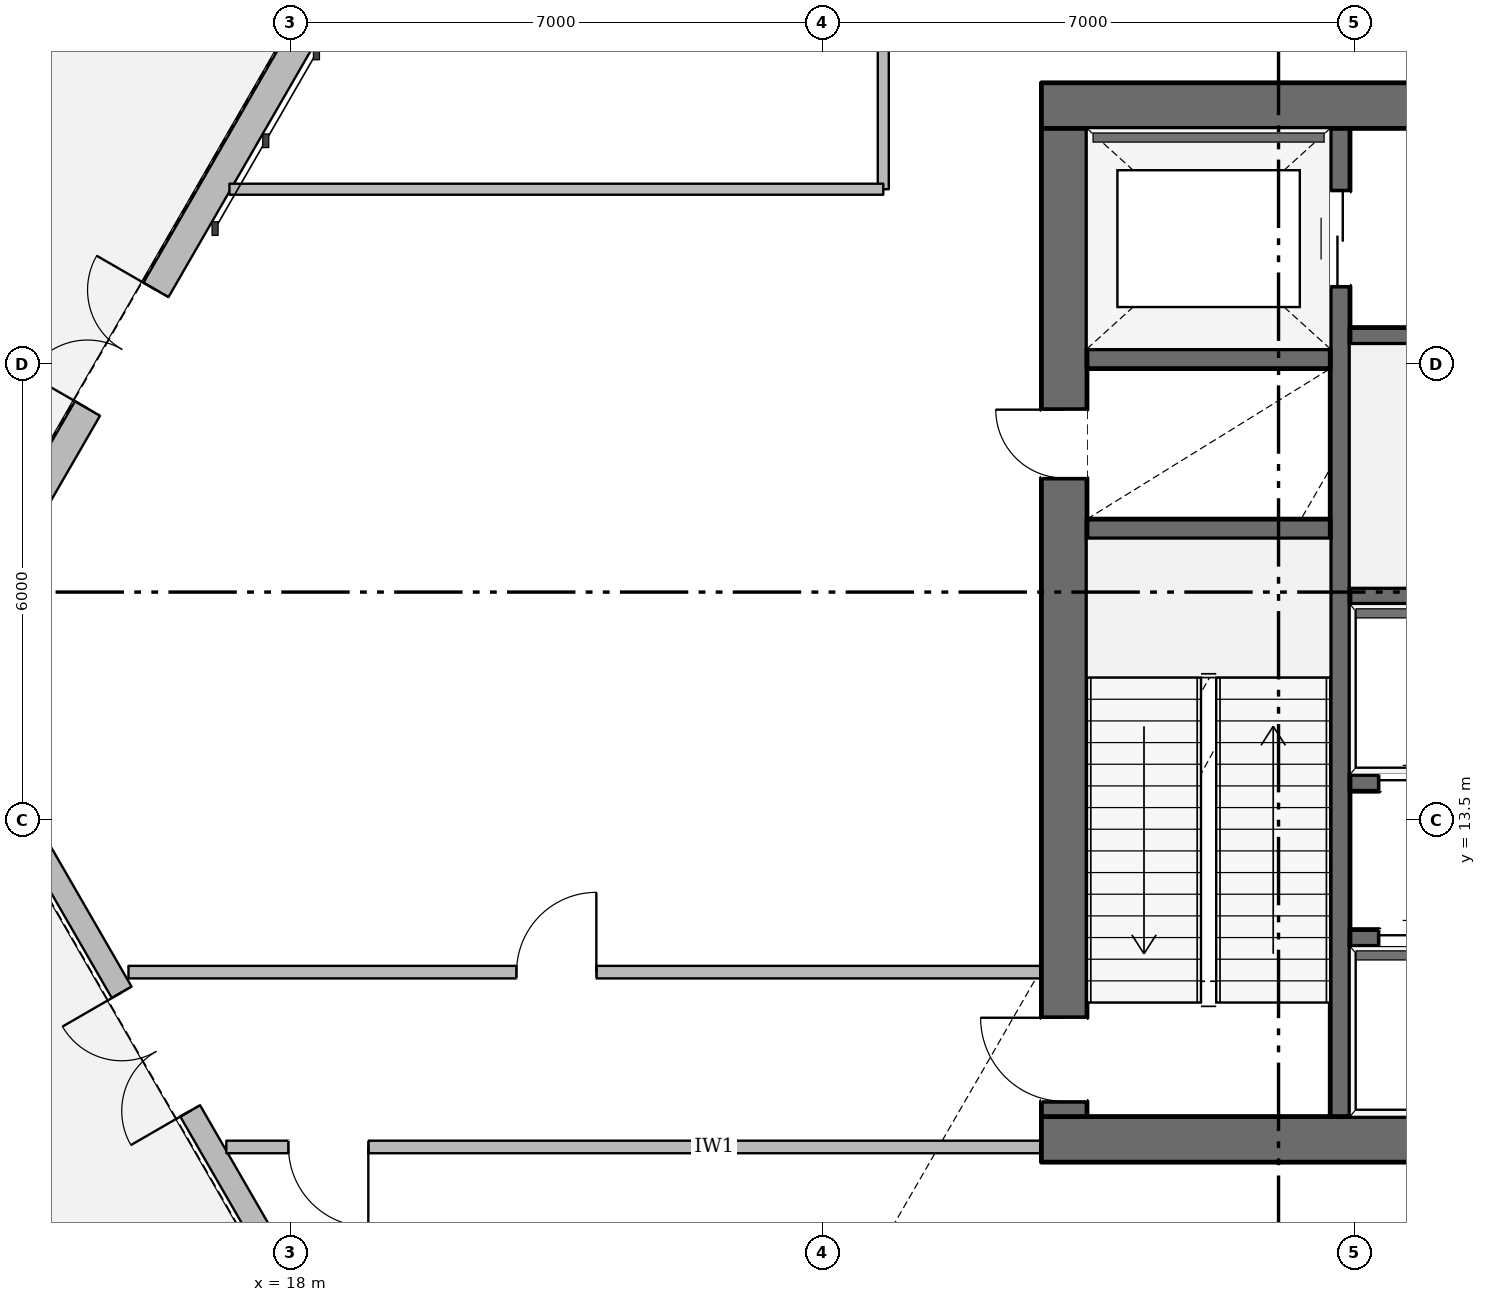
"""IFC4 building model, lengths in metres.
Left out: names, types, materials, properties, quantities, classifications, styles, units other than length and angle.
Written with IfcOpenShell. Run it as: python <this file> out.ifc"""

import sys

from ifc_helpers import new_model, si_unit, direction, frame, frame_2d, origin, place, context, subcontext, project, spatial, rectangle, extrude, element, fill, save


model = new_model("IFC4")
c1 = context("Model", 3, precision=1e-05, world=origin(), true_north=direction((0.0, 1.0)))
c2 = subcontext(c1, "Body", "Model", "MODEL_VIEW")
j1 = project(units=[si_unit("LENGTHUNIT", "METRE"), si_unit("PLANEANGLEUNIT", "RADIAN")], contexts=[c1])
p1 = place(None, origin())
s1 = spatial("IfcSite", under=j1, at=p1, CompositionType="ELEMENT")
p2 = place(p1, origin())
s2 = spatial("IfcBuilding", under=s1, at=p2, CompositionType="ELEMENT")
p3 = place(p2, origin())
s3 = spatial("IfcBuildingStorey", under=s2, at=p3, CompositionType="ELEMENT", Elevation=0.0)
p4 = place(p3, frame((27.88, 9.3, 0.0), z_axis=(0.0, 0.0, 1.0), x_axis=(1.0, 0.0, 0.0)))
e1 = element("IfcWall", 1, at=p4, inside=s3, PredefinedType="SOLIDWALL", context=c2, shape_type="SweptSolid", body=[
    extrude(rectangle(XDim=20.24, YDim=0.6, at=frame_2d((10.12, 0.0))), origin(), (0.0, 0.0, 1.0), 5.74),
])
p5 = place(p4, frame((10.62, 0.0, 0.0)))
e2 = element("IfcOpeningElement", 2, at=p5, cuts=e1, PredefinedType="OPENING", context=c2, shape_type="SweptSolid", body=[
    extrude(rectangle(XDim=1.4, YDim=2.2, at=frame_2d((0.7, 1.1))), frame((0.0, 0.31, 0.0), z_axis=(0.0, -1.0, 0.0), x_axis=(1.0, 0.0, 0.0)), (0.0, 0.0, 1.0), 0.62),
])
p6 = place(p3, frame((27.88, 22.9, 0.0), z_axis=(0.0, 0.0, 1.0), x_axis=(1.0, 0.0, 0.0)))
e3 = element("IfcWall", 3, at=p6, inside=s3, PredefinedType="SOLIDWALL", context=c2, shape_type="SweptSolid", body=[
    extrude(rectangle(XDim=20.24, YDim=0.6, at=frame_2d((10.12, 0.0))), origin(), (0.0, 0.0, 1.0), 5.74),
])
p7 = place(p6, frame((9.595, 0.0, 0.0)))
e4 = element("IfcOpeningElement", 4, at=p7, cuts=e3, PredefinedType="OPENING", context=c2, shape_type="SweptSolid", body=[
    extrude(rectangle(XDim=1.05, YDim=2.15, at=frame_2d((0.525, 1.075))), frame((0.0, 0.31, 0.0), z_axis=(0.0, -1.0, 0.0), x_axis=(1.0, 0.0, 0.0)), (0.0, 0.0, 1.0), 0.62),
])
p8 = place(p6, frame((5.995, 0.0, 0.0)))
e5 = element("IfcOpeningElement", 5, at=p8, cuts=e3, PredefinedType="OPENING", context=c2, shape_type="SweptSolid", body=[
    extrude(rectangle(XDim=1.05, YDim=2.15, at=frame_2d((0.525, 1.075))), frame((0.0, 0.31, 0.0), z_axis=(0.0, -1.0, 0.0), x_axis=(1.0, 0.0, 0.0)), (0.0, 0.0, 1.0), 0.62),
])
p9 = place(p3, frame((28.18, 9.6, 0.0), z_axis=(0.0, 0.0, 1.0), x_axis=(0.0, 1.0, 0.0)))
e6 = element("IfcWall", 6, at=p9, inside=s3, PredefinedType="SOLIDWALL", context=c2, shape_type="SweptSolid", body=[
    extrude(rectangle(XDim=13.0, YDim=0.6, at=frame_2d((6.5, 0.0))), origin(), (0.0, 0.0, 1.0), 5.74),
])
p10 = place(p9, frame((8.4, 0.0, 0.0)))
e7 = element("IfcOpeningElement", 7, at=p10, cuts=e6, PredefinedType="OPENING", context=c2, shape_type="SweptSolid", body=[
    extrude(rectangle(XDim=0.9, YDim=2.1, at=frame_2d((0.45, 1.05))), frame((0.0, 0.31, 0.0), z_axis=(0.0, -1.0, 0.0), x_axis=(1.0, 0.0, 0.0)), (0.0, 0.0, 1.0), 0.62),
])
p11 = place(p9, frame((0.2, 0.0, 0.0)))
e8 = element("IfcOpeningElement", 8, at=p11, cuts=e6, PredefinedType="OPENING", context=c2, shape_type="SweptSolid", body=[
    extrude(rectangle(XDim=1.1, YDim=2.15, at=frame_2d((0.55, 1.075))), frame((0.0, 0.31, 0.0), z_axis=(0.0, -1.0, 0.0), x_axis=(1.0, 0.0, 0.0)), (0.0, 0.0, 1.0), 0.62),
])
p12 = place(p3, frame((31.81, 9.6, 0.0), z_axis=(0.0, 0.0, 1.0), x_axis=(0.0, 1.0, 0.0)))
e9 = element("IfcWall", 9, at=p12, inside=s3, PredefinedType="SHEAR", context=c2, shape_type="SweptSolid", body=[
    extrude(rectangle(XDim=13.0, YDim=0.26, at=frame_2d((6.5, 0.0))), origin(), (0.0, 0.0, 1.0), 5.74),
])
p13 = place(p12, frame((10.925, 0.0, 0.0)))
e10 = element("IfcOpeningElement", 10, at=p13, cuts=e9, PredefinedType="OPENING", context=c2, shape_type="SweptSolid", body=[
    extrude(rectangle(XDim=1.25, YDim=2.25, at=frame_2d((0.625, 1.125))), frame((0.0, 0.14, 0.0), z_axis=(0.0, -1.0, 0.0), x_axis=(1.0, 0.0, 0.0)), (0.0, 0.0, 1.0), 0.28),
])
for number, where, z_axis, x_axis in (
    (11, (28.48, 17.33, 0.0), (0.0, 0.0, 1.0), (1.0, 0.0, 0.0)),
    (12, (28.48, 19.57, 0.0), (0.0, 0.0, 1.0), (1.0, 0.0, 0.0)),
):
    element("IfcWall", number, at=place(p3, frame(where, z_axis=z_axis, x_axis=x_axis)), inside=s3, PredefinedType="SHEAR", context=c2, shape_type="SweptSolid", body=[
        extrude(rectangle(XDim=3.2, YDim=0.26, at=frame_2d((1.6, 0.0))), origin(), (0.0, 0.0, 1.0), 5.74),
    ])
p14 = place(p3, frame((31.94, 19.87, 0.0), z_axis=(0.0, 0.0, 1.0), x_axis=(1.0, 0.0, 0.0)))
e13 = element("IfcWall", 13, at=p14, inside=s3, PredefinedType="SOLIDWALL", context=c2, shape_type="SweptSolid", body=[
    extrude(rectangle(XDim=12.12, YDim=0.22, at=frame_2d((6.06, 0.0))), origin(), (0.0, 0.0, 1.0), 5.74),
])
p15 = place(p14, frame((9.51, 0.0, 0.0)))
e14 = element("IfcOpeningElement", 14, at=p15, cuts=e13, PredefinedType="OPENING", context=c2, shape_type="SweptSolid", body=[
    extrude(rectangle(XDim=0.9, YDim=2.1, at=frame_2d((0.45, 1.05))), frame((0.0, 0.12, 0.0), z_axis=(0.0, -1.0, 0.0), x_axis=(1.0, 0.0, 0.0)), (0.0, 0.0, 1.0), 0.24),
])
p16 = place(p3, frame((31.94, 16.45, 0.0), z_axis=(0.0, 0.0, 1.0), x_axis=(1.0, 0.0, 0.0)))
e15 = element("IfcWall", 15, at=p16, inside=s3, PredefinedType="SOLIDWALL", context=c2, shape_type="SweptSolid", body=[
    extrude(rectangle(XDim=12.12, YDim=0.22, at=frame_2d((6.06, 0.0))), origin(), (0.0, 0.0, 1.0), 5.74),
])
p17 = place(p3, frame((31.94, 13.99, 0.0), z_axis=(0.0, 0.0, 1.0), x_axis=(1.0, 0.0, 0.0)))
e16 = element("IfcWall", 16, at=p17, inside=s3, PredefinedType="SOLIDWALL", context=c2, shape_type="SweptSolid", body=[
    extrude(rectangle(XDim=12.12, YDim=0.22, at=frame_2d((6.06, 0.0))), origin(), (0.0, 0.0, 1.0), 5.74),
])
p18 = place(p17, frame((0.385, 0.0, 0.0)))
e17 = element("IfcOpeningElement", 17, at=p18, cuts=e16, PredefinedType="OPENING", context=c2, shape_type="SweptSolid", body=[
    extrude(rectangle(XDim=1.1, YDim=2.2, at=frame_2d((0.55, 1.1))), frame((0.0, 0.12, 0.0), z_axis=(0.0, -1.0, 0.0), x_axis=(1.0, 0.0, 0.0)), (0.0, 0.0, 1.0), 0.24),
])
p19 = place(p17, frame((2.435, 0.0, 0.0)))
e18 = element("IfcOpeningElement", 18, at=p19, cuts=e16, PredefinedType="OPENING", context=c2, shape_type="SweptSolid", body=[
    extrude(rectangle(XDim=1.1, YDim=2.2, at=frame_2d((0.55, 1.1))), frame((0.0, 0.12, 0.0), z_axis=(0.0, -1.0, 0.0), x_axis=(1.0, 0.0, 0.0)), (0.0, 0.0, 1.0), 0.24),
])
p20 = place(p17, frame((4.485, 0.0, 0.0)))
e19 = element("IfcOpeningElement", 19, at=p20, cuts=e16, PredefinedType="OPENING", context=c2, shape_type="SweptSolid", body=[
    extrude(rectangle(XDim=1.1, YDim=2.2, at=frame_2d((0.55, 1.1))), frame((0.0, 0.12, 0.0), z_axis=(0.0, -1.0, 0.0), x_axis=(1.0, 0.0, 0.0)), (0.0, 0.0, 1.0), 0.24),
])
p21 = place(p17, frame((6.535, 0.0, 0.0)))
e20 = element("IfcOpeningElement", 20, at=p21, cuts=e16, PredefinedType="OPENING", context=c2, shape_type="SweptSolid", body=[
    extrude(rectangle(XDim=1.1, YDim=2.2, at=frame_2d((0.55, 1.1))), frame((0.0, 0.12, 0.0), z_axis=(0.0, -1.0, 0.0), x_axis=(1.0, 0.0, 0.0)), (0.0, 0.0, 1.0), 0.24),
])
p22 = place(p17, frame((8.585, 0.0, 0.0)))
e21 = element("IfcOpeningElement", 21, at=p22, cuts=e16, PredefinedType="OPENING", context=c2, shape_type="SweptSolid", body=[
    extrude(rectangle(XDim=1.1, YDim=2.2, at=frame_2d((0.55, 1.1))), frame((0.0, 0.12, 0.0), z_axis=(0.0, -1.0, 0.0), x_axis=(1.0, 0.0, 0.0)), (0.0, 0.0, 1.0), 0.24),
])
p23 = place(p17, frame((10.635, 0.0, 0.0)))
e22 = element("IfcOpeningElement", 22, at=p23, cuts=e16, PredefinedType="OPENING", context=c2, shape_type="SweptSolid", body=[
    extrude(rectangle(XDim=1.1, YDim=2.2, at=frame_2d((0.55, 1.1))), frame((0.0, 0.12, 0.0), z_axis=(0.0, -1.0, 0.0), x_axis=(1.0, 0.0, 0.0)), (0.0, 0.0, 1.0), 0.24),
])
p24 = place(p3, frame((31.94, 11.95, 0.0), z_axis=(0.0, 0.0, 1.0), x_axis=(1.0, 0.0, 0.0)))
e23 = element("IfcWall", 23, at=p24, inside=s3, PredefinedType="SOLIDWALL", context=c2, shape_type="SweptSolid", body=[
    extrude(rectangle(XDim=6.19, YDim=0.22, at=frame_2d((3.095, 0.0))), origin(), (0.0, 0.0, 1.0), 5.74),
])
p25 = place(p24, frame((0.385, 0.0, 0.0)))
e24 = element("IfcOpeningElement", 24, at=p25, cuts=e23, PredefinedType="OPENING", context=c2, shape_type="SweptSolid", body=[
    extrude(rectangle(XDim=1.1, YDim=2.2, at=frame_2d((0.55, 1.1))), frame((0.0, 0.12, 0.0), z_axis=(0.0, -1.0, 0.0), x_axis=(1.0, 0.0, 0.0)), (0.0, 0.0, 1.0), 0.24),
])
p26 = place(p24, frame((2.435, 0.0, 0.0)))
e25 = element("IfcOpeningElement", 25, at=p26, cuts=e23, PredefinedType="OPENING", context=c2, shape_type="SweptSolid", body=[
    extrude(rectangle(XDim=1.1, YDim=2.2, at=frame_2d((0.55, 1.1))), frame((0.0, 0.12, 0.0), z_axis=(0.0, -1.0, 0.0), x_axis=(1.0, 0.0, 0.0)), (0.0, 0.0, 1.0), 0.24),
])
p27 = place(p24, frame((4.485, 0.0, 0.0)))
e26 = element("IfcOpeningElement", 26, at=p27, cuts=e23, PredefinedType="OPENING", context=c2, shape_type="SweptSolid", body=[
    extrude(rectangle(XDim=1.1, YDim=2.2, at=frame_2d((0.55, 1.1))), frame((0.0, 0.12, 0.0), z_axis=(0.0, -1.0, 0.0), x_axis=(1.0, 0.0, 0.0)), (0.0, 0.0, 1.0), 0.24),
])
p28 = place(p3, frame((13.177, 15.186, 0.0), z_axis=(0.0, 0.0, 1.0), x_axis=(0.500000109808, 0.866025340387, 0.0)))
e27 = element("IfcWall", 27, at=p28, inside=s3, PredefinedType="STANDARD", context=c2, shape_type="SweptSolid", body=[
    extrude(rectangle(XDim=33.16, YDim=0.38, at=frame_2d((16.58, 0.0))), origin(), (0.0, 0.0, 1.0), 3.43),
])
p29 = place(p28, frame((4.307, 0.0, 0.0)))
e28 = element("IfcOpeningElement", 28, at=p29, cuts=e27, PredefinedType="OPENING", context=c2, shape_type="SweptSolid", body=[
    extrude(rectangle(XDim=1.8, YDim=2.25, at=frame_2d((0.9, 1.125))), frame((0.0, 0.2, 0.0), z_axis=(0.0, -1.0, 0.0), x_axis=(1.0, 0.0, 0.0)), (0.0, 0.0, 1.0), 0.4),
])
p30 = place(p28, frame((28.699, 0.0, 0.55)))
e29 = element("IfcOpeningElement", 29, at=p30, cuts=e27, PredefinedType="OPENING", context=c2, shape_type="SweptSolid", body=[
    extrude(rectangle(XDim=2.6, YDim=2.55, at=frame_2d((1.3, 1.275))), frame((0.0, 0.2, 0.0), z_axis=(0.0, -1.0, 0.0), x_axis=(1.0, 0.0, 0.0)), (0.0, 0.0, 1.0), 0.4),
])
p31 = place(p3, frame((21.902, 0.632, 0.0), z_axis=(0.0, 0.0, 1.0), x_axis=(-0.500005062714, 0.866022480806, 0.0)))
e30 = element("IfcWall", 30, at=p31, inside=s3, PredefinedType="STANDARD", context=c2, shape_type="SweptSolid", body=[
    extrude(rectangle(XDim=17.448, YDim=0.3, at=frame_2d((8.724, 0.0))), origin(), (0.0, 0.0, 1.0), 3.43),
])
p32 = place(p31, frame((10.442, 0.0, 0.0)))
e31 = element("IfcOpeningElement", 31, at=p32, cuts=e30, PredefinedType="OPENING", context=c2, shape_type="SweptSolid", body=[
    extrude(rectangle(XDim=1.8, YDim=2.25, at=frame_2d((0.9, 1.125))), frame((0.0, 0.16, 0.0), z_axis=(0.0, -1.0, 0.0), x_axis=(1.0, 0.0, 0.0)), (0.0, 0.0, 1.0), 0.32),
])
p33 = place(p31, frame((4.836, 0.0, 0.0)))
e32 = element("IfcOpeningElement", 32, at=p33, cuts=e30, PredefinedType="OPENING", context=c2, shape_type="SweptSolid", body=[
    extrude(rectangle(XDim=2.0, YDim=2.6, at=frame_2d((1.0, 1.3))), frame((0.0, 0.16, 0.0), z_axis=(0.0, -1.0, 0.0), x_axis=(1.0, 0.0, 0.0)), (0.0, 0.0, 1.0), 0.32),
])
p34 = place(p3, frame((27.88, 9.2, 0.0), z_axis=(0.0, 0.0, 1.0), x_axis=(-1.0, 0.0, 0.0)))
e33 = element("IfcWall", 33, at=p34, inside=s3, PredefinedType="PARTITIONING", context=c2, shape_type="SweptSolid", body=[
    extrude(rectangle(XDim=10.723, YDim=0.165, at=frame_2d((5.361, 0.0))), origin(), (0.0, 0.0, 1.0), 5.74),
])
p35 = place(p34, frame((8.855, 0.0, 0.0)))
e34 = element("IfcOpeningElement", 34, at=p35, cuts=e33, PredefinedType="OPENING", context=c2, shape_type="SweptSolid", body=[
    extrude(rectangle(XDim=1.05, YDim=2.15, at=frame_2d((0.525, 1.075))), frame((0.0, 0.093, 0.0), z_axis=(0.0, -1.0, 0.0), x_axis=(1.0, 0.0, 0.0)), (0.0, 0.0, 1.0), 0.185),
])
p36 = place(p3, frame((15.87, 11.5, 0.0), z_axis=(0.0, 0.0, 1.0), x_axis=(1.0, 0.0, 0.0)))
e35 = element("IfcWall", 35, at=p36, inside=s3, PredefinedType="PARTITIONING", context=c2, shape_type="SweptSolid", body=[
    extrude(rectangle(XDim=12.01, YDim=0.165, at=frame_2d((6.005, 0.0))), origin(), (0.0, 0.0, 1.0), 5.74),
])
p37 = place(p36, frame((5.105, 0.0, 0.0)))
e36 = element("IfcOpeningElement", 36, at=p37, cuts=e35, PredefinedType="OPENING", context=c2, shape_type="SweptSolid", body=[
    extrude(rectangle(XDim=1.05, YDim=2.15, at=frame_2d((0.525, 1.075))), frame((0.0, 0.093, 0.0), z_axis=(0.0, -1.0, 0.0), x_axis=(1.0, 0.0, 0.0)), (0.0, 0.0, 1.0), 0.185),
])
p38 = place(p3, frame((25.8, 21.8, 0.0), z_axis=(0.0, 0.0, 1.0), x_axis=(0.0, 1.0, 0.0)))
e37 = element("IfcWall", 37, at=p38, inside=s3, PredefinedType="PARTITIONING", context=c2, shape_type="SweptSolid", body=[
    extrude(rectangle(XDim=14.899, YDim=0.145, at=frame_2d((7.449, 0.0))), origin(), (0.0, 0.0, 1.0), 3.435),
])
p39 = place(p38, frame((3.0, 0.0, 0.0)))
e38 = element("IfcOpeningElement", 38, at=p39, cuts=e37, PredefinedType="OPENING", context=c2, shape_type="SweptSolid", body=[
    extrude(rectangle(XDim=1.4, YDim=2.2, at=frame_2d((0.7, 1.1))), frame((0.0, 0.083, 0.0), z_axis=(0.0, -1.0, 0.0), x_axis=(1.0, 0.0, 0.0)), (0.0, 0.0, 1.0), 0.165),
])
p40 = place(p3, frame((17.198, 21.8, 0.0), z_axis=(0.0, 0.0, 1.0), x_axis=(1.0, 0.0, 0.0)))
e39 = element("IfcWall", 39, at=p40, inside=s3, PredefinedType="PARTITIONING", context=c2, shape_type="SweptSolid", body=[
    extrude(rectangle(XDim=8.602, YDim=0.145, at=frame_2d((4.301, 0.0))), origin(), (0.0, 0.0, 1.0), 5.74),
])
p41 = place(p32, origin())
e40 = element("IfcDoor", 40, at=p41, inside=s3, OperationType="DOUBLE_DOOR_SINGLE_SWING", PredefinedType="DOOR", context=c2, shape_type="SweptSolid", body=[
    extrude(rectangle(XDim=1.8, YDim=2.25, at=frame_2d((0.9, 1.125))), frame((0.0, 0.025, 0.0), z_axis=(0.0, -1.0, 0.0), x_axis=(1.0, 0.0, 0.0)), (0.0, 0.0, 1.0), 0.05),
])
fill(e31, e40)
p42 = place(p29, origin())
e41 = element("IfcDoor", 41, at=p42, inside=s3, OperationType="DOUBLE_DOOR_SINGLE_SWING", PredefinedType="DOOR", context=c2, shape_type="SweptSolid", body=[
    extrude(rectangle(XDim=1.8, YDim=2.25, at=frame_2d((0.9, 1.125))), frame((0.0, 0.025, 0.0), z_axis=(0.0, -1.0, 0.0), x_axis=(1.0, 0.0, 0.0)), (0.0, 0.0, 1.0), 0.05),
])
fill(e28, e41)
p43 = place(p10, origin())
e42 = element("IfcDoor", 42, at=p43, inside=s3, OperationType="SINGLE_SWING_RIGHT", PredefinedType="DOOR", context=c2, shape_type="SweptSolid", body=[
    extrude(rectangle(XDim=0.9, YDim=2.1, at=frame_2d((0.45, 1.05))), frame((0.0, 0.025, 0.0), z_axis=(0.0, -1.0, 0.0), x_axis=(1.0, 0.0, 0.0)), (0.0, 0.0, 1.0), 0.05),
])
fill(e7, e42)
p44 = place(p13, origin())
e43 = element("IfcDoor", 43, at=p44, inside=s3, OperationType="DOUBLE_DOOR_SLIDING", PredefinedType="DOOR", context=c2, shape_type="SweptSolid", body=[
    extrude(rectangle(XDim=1.25, YDim=2.25, at=frame_2d((0.625, 1.125))), frame((0.0, 0.025, 0.0), z_axis=(0.0, -1.0, 0.0), x_axis=(1.0, 0.0, 0.0)), (0.0, 0.0, 1.0), 0.05),
])
fill(e10, e43)
p45 = place(p25, origin())
e44 = element("IfcDoor", 44, at=p45, inside=s3, OperationType="DOUBLE_DOOR_SLIDING", PredefinedType="DOOR", context=c2, shape_type="SweptSolid", body=[
    extrude(rectangle(XDim=1.1, YDim=2.2, at=frame_2d((0.55, 1.1))), frame((0.0, 0.025, 0.0), z_axis=(0.0, -1.0, 0.0), x_axis=(1.0, 0.0, 0.0)), (0.0, 0.0, 1.0), 0.05),
])
fill(e24, e44)
p46 = place(p18, origin())
e45 = element("IfcDoor", 45, at=p46, inside=s3, OperationType="DOUBLE_DOOR_SLIDING", PredefinedType="DOOR", context=c2, shape_type="SweptSolid", body=[
    extrude(rectangle(XDim=1.1, YDim=2.2, at=frame_2d((0.55, 1.1))), frame((0.0, 0.025, 0.0), z_axis=(0.0, -1.0, 0.0), x_axis=(1.0, 0.0, 0.0)), (0.0, 0.0, 1.0), 0.05),
])
fill(e17, e45)
p47 = place(p11, origin())
e46 = element("IfcDoor", 46, at=p47, inside=s3, OperationType="SINGLE_SWING_RIGHT", PredefinedType="DOOR", context=c2, shape_type="SweptSolid", body=[
    extrude(rectangle(XDim=1.1, YDim=2.15, at=frame_2d((0.55, 1.075))), frame((0.0, 0.025, 0.0), z_axis=(0.0, -1.0, 0.0), x_axis=(1.0, 0.0, 0.0)), (0.0, 0.0, 1.0), 0.05),
])
fill(e8, e46)
p48 = place(p37, origin())
e47 = element("IfcDoor", 47, at=p48, inside=s3, OperationType="SINGLE_SWING_RIGHT", PredefinedType="DOOR", context=c2, shape_type="SweptSolid", body=[
    extrude(rectangle(XDim=1.05, YDim=2.15, at=frame_2d((0.525, 1.075))), frame((0.0, 0.025, 0.0), z_axis=(0.0, -1.0, 0.0), x_axis=(1.0, 0.0, 0.0)), (0.0, 0.0, 1.0), 0.05),
])
fill(e36, e47)
p49 = place(p35, origin())
e48 = element("IfcDoor", 48, at=p49, inside=s3, OperationType="SINGLE_SWING_LEFT", PredefinedType="DOOR", context=c2, shape_type="SweptSolid", body=[
    extrude(rectangle(XDim=1.05, YDim=2.15, at=frame_2d((0.525, 1.075))), frame((0.0, 0.025, 0.0), z_axis=(0.0, -1.0, 0.0), x_axis=(1.0, 0.0, 0.0)), (0.0, 0.0, 1.0), 0.05),
])
fill(e34, e48)
save(model, sys.argv[1])
